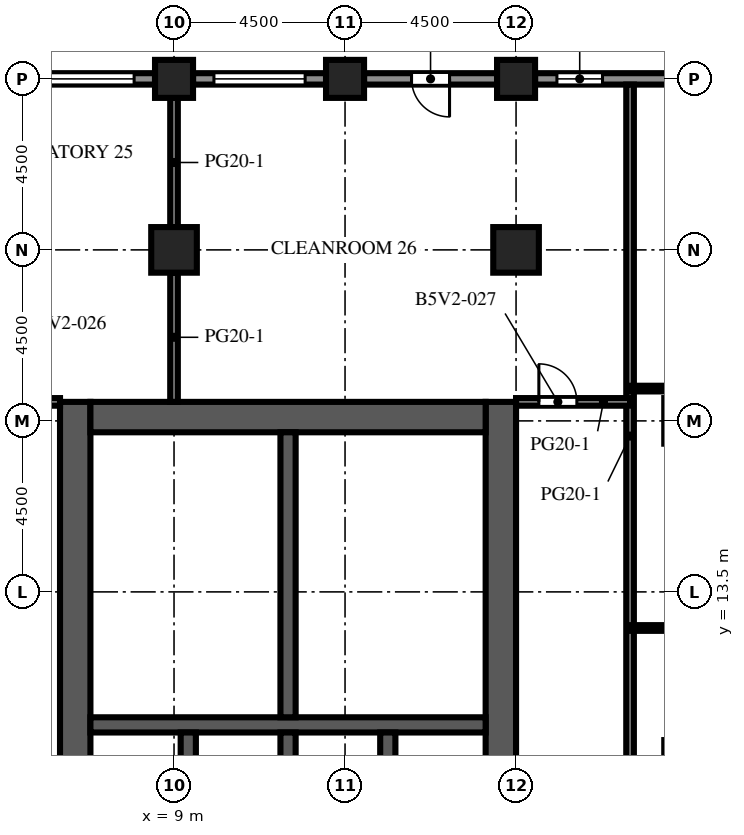
"""IFC4 building model, lengths in metres.
Left out: names, types, materials, properties, quantities, classifications, styles, units other than length and angle.
Written with IfcOpenShell. Run it as: python <this file> out.ifc"""

import sys

from ifc_helpers import new_model, si_unit, direction, frame, frame_2d, origin, origin_2d, place, context, subcontext, project, spatial, rectangle, extrude, element, fill, save


model = new_model("IFC4")
c1 = context("Model", 3, precision=1e-05, world=origin(), true_north=direction((0.0, 1.0)))
c2 = subcontext(c1, "Body", "Model", "MODEL_VIEW")
j1 = project(units=[si_unit("LENGTHUNIT", "METRE"), si_unit("PLANEANGLEUNIT", "RADIAN")], contexts=[c1])
p1 = place(None, origin())
s1 = spatial("IfcSite", under=j1, at=p1, CompositionType="ELEMENT")
p2 = place(p1, origin())
s2 = spatial("IfcBuilding", under=s1, at=p2, CompositionType="ELEMENT")
p3 = place(p2, frame((0.0, 0.0, 177.3)))
s3 = spatial("IfcBuildingStorey", under=s2, at=p3, CompositionType="ELEMENT", Elevation=177.3)
for number, where, z_axis, x_axis in (
    (1, (9.0, 27.0, 0.0), (0.0, 0.0, 1.0), (1.0, 0.0, 0.0)),
    (2, (13.5, 27.0, 0.0), (0.0, 0.0, 1.0), (1.0, 0.0, 0.0)),
    (3, (18.0, 27.0, 0.0), (0.0, 0.0, 1.0), (1.0, 0.0, 0.0)),
):
    element("IfcColumn", number, at=place(p3, frame(where, z_axis=z_axis, x_axis=x_axis)), inside=s3, PredefinedType="COLUMN", context=c2, shape_type="SweptSolid", body=[
        extrude(rectangle(XDim=1.0, YDim=1.0, at=origin_2d()), origin(), (0.0, 0.0, 1.0), 4.1),
    ])
for number, where, z_axis, x_axis in (
    (4, (9.0, 22.5, 0.0), (0.0, 0.0, 1.0), (1.0, 0.0, 0.0)),
    (5, (18.0, 22.5, 0.0), (0.0, 0.0, 1.0), (1.0, 0.0, 0.0)),
):
    element("IfcColumn", number, at=place(p3, frame(where, z_axis=z_axis, x_axis=x_axis)), inside=s3, PredefinedType="COLUMN", context=c2, shape_type="SweptSolid", body=[
        extrude(rectangle(XDim=1.2, YDim=1.2, at=origin_2d()), origin(), (0.0, 0.0, 1.0), 4.1),
    ])
p4 = place(p3, frame((6.4, -9.0, 0.0), z_axis=(0.0, 0.0, 1.0), x_axis=(0.0, 1.0, 0.0)))
e6 = element("IfcWall", 6, at=p4, inside=s3, PredefinedType="SHEAR", context=c2, shape_type="SweptSolid", body=[
    extrude(rectangle(XDim=27.5, YDim=0.8, at=frame_2d((13.75, 0.0))), origin(), (0.0, 0.0, 1.0), 4.1),
])
p5 = place(p4, frame((12.55, 0.0, 0.0)))
e7 = element("IfcOpeningElement", 7, at=p5, cuts=e6, PredefinedType="OPENING", context=c2, shape_type="SweptSolid", body=[
    extrude(rectangle(XDim=2.4, YDim=2.4, at=frame_2d((1.2, 1.2))), frame((0.0, 0.41, 0.0), z_axis=(0.0, -1.0, 0.0), x_axis=(1.0, 0.0, 0.0)), (0.0, 0.0, 1.0), 0.82),
])
p6 = place(p4, frame((3.85, 0.0, 0.0)))
e8 = element("IfcOpeningElement", 8, at=p6, cuts=e6, PredefinedType="OPENING", context=c2, shape_type="SweptSolid", body=[
    extrude(rectangle(XDim=0.95, YDim=2.1, at=frame_2d((0.475, 1.05))), frame((0.0, 0.41, 0.0), z_axis=(0.0, -1.0, 0.0), x_axis=(1.0, 0.0, 0.0)), (0.0, 0.0, 1.0), 0.82),
])
p7 = place(p4, frame((23.475, 0.0, 0.0)))
e9 = element("IfcOpeningElement", 9, at=p7, cuts=e6, PredefinedType="OPENING", context=c2, shape_type="SweptSolid", body=[
    extrude(rectangle(XDim=1.2, YDim=2.1, at=frame_2d((0.6, 1.05))), frame((0.0, 0.41, 0.0), z_axis=(0.0, -1.0, 0.0), x_axis=(1.0, 0.0, 0.0)), (0.0, 0.0, 1.0), 0.82),
])
p8 = place(p3, frame((17.6, -9.0, 0.0), z_axis=(0.0, 0.0, 1.0), x_axis=(0.0, 1.0, 0.0)))
e10 = element("IfcWall", 10, at=p8, inside=s3, PredefinedType="SHEAR", context=c2, shape_type="SweptSolid", body=[
    extrude(rectangle(XDim=27.5, YDim=0.8, at=frame_2d((13.75, 0.0))), origin(), (0.0, 0.0, 1.0), 4.1),
])
p9 = place(p8, frame((12.55, 0.0, 0.0)))
e11 = element("IfcOpeningElement", 11, at=p9, cuts=e10, PredefinedType="OPENING", context=c2, shape_type="SweptSolid", body=[
    extrude(rectangle(XDim=2.4, YDim=2.4, at=frame_2d((1.2, 1.2))), frame((0.0, 0.41, 0.0), z_axis=(0.0, -1.0, 0.0), x_axis=(1.0, 0.0, 0.0)), (0.0, 0.0, 1.0), 0.82),
])
p10 = place(p8, frame((6.825, 0.0, 0.0)))
e12 = element("IfcOpeningElement", 12, at=p10, cuts=e10, PredefinedType="OPENING", context=c2, shape_type="SweptSolid", body=[
    extrude(rectangle(XDim=1.2, YDim=2.1, at=frame_2d((0.6, 1.05))), frame((0.0, 0.41, 0.0), z_axis=(0.0, -1.0, 0.0), x_axis=(1.0, 0.0, 0.0)), (0.0, 0.0, 1.0), 0.82),
])
p11 = place(p8, frame((19.475, 0.0, 0.0)))
e13 = element("IfcOpeningElement", 13, at=p11, cuts=e10, PredefinedType="OPENING", context=c2, shape_type="SweptSolid", body=[
    extrude(rectangle(XDim=1.2, YDim=2.1, at=frame_2d((0.6, 1.05))), frame((0.0, 0.41, 0.0), z_axis=(0.0, -1.0, 0.0), x_axis=(1.0, 0.0, 0.0)), (0.0, 0.0, 1.0), 0.82),
])
p12 = place(p3, frame((6.8, 18.1, 0.0), z_axis=(0.0, 0.0, 1.0), x_axis=(1.0, 0.0, 0.0)))
e14 = element("IfcWall", 14, at=p12, inside=s3, PredefinedType="SHEAR", context=c2, shape_type="SweptSolid", body=[
    extrude(rectangle(XDim=10.4, YDim=0.8, at=frame_2d((5.2, 0.0))), origin(), (0.0, 0.0, 1.0), 4.1),
])
p13 = place(p3, frame((6.8, 10.0, 0.0), z_axis=(0.0, 0.0, 1.0), x_axis=(1.0, 0.0, 0.0)))
e15 = element("IfcWall", 15, at=p13, inside=s3, PredefinedType="SHEAR", context=c2, shape_type="SweptSolid", body=[
    extrude(rectangle(XDim=10.4, YDim=0.4, at=frame_2d((5.2, 0.0))), origin(), (0.0, 0.0, 1.0), 4.1),
])
for number, where, z_axis, x_axis in (
    (16, (9.375, 6.9, 0.0), (0.0, 0.0, 1.0), (0.0, 1.0, 0.0)),
    (17, (12.0, 6.9, 0.0), (0.0, 0.0, 1.0), (0.0, 1.0, 0.0)),
    (18, (14.625, 6.9, 0.0), (0.0, 0.0, 1.0), (0.0, 1.0, 0.0)),
):
    element("IfcWall", number, at=place(p3, frame(where, z_axis=z_axis, x_axis=x_axis)), inside=s3, PredefinedType="SHEAR", context=c2, shape_type="SweptSolid", body=[
        extrude(rectangle(XDim=2.9, YDim=0.4, at=frame_2d((1.45, 0.0))), origin(), (0.0, 0.0, 1.0), 4.1),
    ])
p14 = place(p3, frame((12.0, 10.2, 0.0), z_axis=(0.0, 0.0, 1.0), x_axis=(0.0, 1.0, 0.0)))
e19 = element("IfcWall", 19, at=p14, inside=s3, PredefinedType="SHEAR", context=c2, shape_type="SweptSolid", body=[
    extrude(rectangle(XDim=7.5, YDim=0.4, at=frame_2d((3.75, 0.0))), origin(), (0.0, 0.0, 1.0), 4.1),
])
p15 = place(p3, frame((18.5, 27.0, 0.0), z_axis=(0.0, 0.0, 1.0), x_axis=(1.0, 0.0, 0.0)))
e20 = element("IfcWall", 20, at=p15, inside=s3, PredefinedType="SOLIDWALL", context=c2, shape_type="SweptSolid", body=[
    extrude(rectangle(XDim=3.5, YDim=0.3, at=frame_2d((1.75, 0.0))), origin(), (0.0, 0.0, 1.0), 2.85),
])
p16 = place(p15, frame((0.575, 0.0, 0.8)))
e21 = element("IfcOpeningElement", 21, at=p16, cuts=e20, PredefinedType="OPENING", context=c2, shape_type="SweptSolid", body=[
    extrude(rectangle(XDim=1.2, YDim=1.7, at=frame_2d((0.6, 0.85))), frame((0.0, 0.16, 0.0), z_axis=(0.0, -1.0, 0.0), x_axis=(1.0, 0.0, 0.0)), (0.0, 0.0, 1.0), 0.32),
])
p17 = place(p3, frame((14.0, 27.0, 0.0), z_axis=(0.0, 0.0, 1.0), x_axis=(1.0, 0.0, 0.0)))
e22 = element("IfcWall", 22, at=p17, inside=s3, PredefinedType="SOLIDWALL", context=c2, shape_type="SweptSolid", body=[
    extrude(rectangle(XDim=3.5, YDim=0.3, at=frame_2d((1.75, 0.0))), origin(), (0.0, 0.0, 1.0), 2.85),
])
p18 = place(p17, frame((1.25, 0.0, 0.0)))
e23 = element("IfcOpeningElement", 23, at=p18, cuts=e22, PredefinedType="OPENING", context=c2, shape_type="SweptSolid", body=[
    extrude(rectangle(XDim=1.0, YDim=2.2, at=frame_2d((0.5, 1.1))), frame((0.0, 0.16, 0.0), z_axis=(0.0, -1.0, 0.0), x_axis=(1.0, 0.0, 0.0)), (0.0, 0.0, 1.0), 0.32),
])
p19 = place(p3, frame((9.5, 27.0, 0.0), z_axis=(0.0, 0.0, 1.0), x_axis=(1.0, 0.0, 0.0)))
e24 = element("IfcWall", 24, at=p19, inside=s3, PredefinedType="SOLIDWALL", context=c2, shape_type="SweptSolid", body=[
    extrude(rectangle(XDim=3.5, YDim=0.3, at=frame_2d((1.75, 0.0))), origin(), (0.0, 0.0, 1.0), 2.85),
])
p20 = place(p19, frame((0.55, 0.0, 0.8)))
e25 = element("IfcOpeningElement", 25, at=p20, cuts=e24, PredefinedType="OPENING", context=c2, shape_type="SweptSolid", body=[
    extrude(rectangle(XDim=2.4, YDim=1.7, at=frame_2d((1.2, 0.85))), frame((0.0, 0.16, 0.0), z_axis=(0.0, -1.0, 0.0), x_axis=(1.0, 0.0, 0.0)), (0.0, 0.0, 1.0), 0.32),
])
p21 = place(p3, frame((5.0, 27.0, 0.0), z_axis=(0.0, 0.0, 1.0), x_axis=(1.0, 0.0, 0.0)))
e26 = element("IfcWall", 26, at=p21, inside=s3, PredefinedType="SOLIDWALL", context=c2, shape_type="SweptSolid", body=[
    extrude(rectangle(XDim=3.5, YDim=0.3, at=frame_2d((1.75, 0.0))), origin(), (0.0, 0.0, 1.0), 2.85),
])
p22 = place(p21, frame((0.55, 0.0, 0.8)))
e27 = element("IfcOpeningElement", 27, at=p22, cuts=e26, PredefinedType="OPENING", context=c2, shape_type="SweptSolid", body=[
    extrude(rectangle(XDim=2.4, YDim=1.7, at=frame_2d((1.2, 0.85))), frame((0.0, 0.16, 0.0), z_axis=(0.0, -1.0, 0.0), x_axis=(1.0, 0.0, 0.0)), (0.0, 0.0, 1.0), 0.32),
])
p23 = place(p3, frame((6.8, 12.45, 0.0), z_axis=(0.0, 0.0, 1.0), x_axis=(1.0, 0.0, 0.0)))
e28 = element("IfcWall", 28, at=p23, inside=s3, PredefinedType="PARTITIONING", context=c2, shape_type="SweptSolid", body=[
    extrude(rectangle(XDim=1.3, YDim=0.1, at=frame_2d((0.65, 0.0))), origin(), (0.0, 0.0, 1.0), 3.65),
])
p24 = place(p23, frame((0.2, 0.0, 0.0)))
e29 = element("IfcOpeningElement", 29, at=p24, cuts=e28, PredefinedType="OPENING", context=c2, shape_type="SweptSolid", body=[
    extrude(rectangle(XDim=0.9, YDim=2.1, at=frame_2d((0.45, 1.05))), frame((0.0, 0.06, 0.0), z_axis=(0.0, -1.0, 0.0), x_axis=(1.0, 0.0, 0.0)), (0.0, 0.0, 1.0), 0.12),
])
p25 = place(p3, frame((8.1, 12.45, 0.0), z_axis=(0.0, 0.0, 1.0), x_axis=(1.0, 0.0, 0.0)))
e30 = element("IfcWall", 30, at=p25, inside=s3, PredefinedType="PARTITIONING", context=c2, shape_type="SweptSolid", body=[
    extrude(rectangle(XDim=3.7, YDim=0.1, at=frame_2d((1.85, 0.0))), origin(), (0.0, 0.0, 1.0), 3.65),
])
p26 = place(p3, frame((8.1, 12.45, 0.0), z_axis=(0.0, 0.0, 1.0), x_axis=(0.0, 1.0, 0.0)))
e31 = element("IfcWall", 31, at=p26, inside=s3, PredefinedType="PARTITIONING", context=c2, shape_type="SweptSolid", body=[
    extrude(rectangle(XDim=2.625, YDim=0.1, at=frame_2d((1.312, 0.0))), origin(), (0.0, 0.0, 1.0), 3.65),
])
p27 = place(p26, frame((0.812, 0.0, 0.0)))
e32 = element("IfcOpeningElement", 32, at=p27, cuts=e31, PredefinedType="OPENING", context=c2, shape_type="SweptSolid", body=[
    extrude(rectangle(XDim=1.0, YDim=2.1, at=frame_2d((0.5, 1.05))), frame((0.0, 0.06, 0.0), z_axis=(0.0, -1.0, 0.0), x_axis=(1.0, 0.0, 0.0)), (0.0, 0.0, 1.0), 0.12),
])
p28 = place(p3, frame((8.1, 15.075, 0.0), z_axis=(0.0, 0.0, 1.0), x_axis=(0.0, 1.0, 0.0)))
e33 = element("IfcWall", 33, at=p28, inside=s3, PredefinedType="PARTITIONING", context=c2, shape_type="SweptSolid", body=[
    extrude(rectangle(XDim=2.625, YDim=0.1, at=frame_2d((1.312, 0.0))), origin(), (0.0, 0.0, 1.0), 3.65),
])
p29 = place(p28, frame((0.812, 0.0, 0.0)))
e34 = element("IfcOpeningElement", 34, at=p29, cuts=e33, PredefinedType="OPENING", context=c2, shape_type="SweptSolid", body=[
    extrude(rectangle(XDim=1.0, YDim=2.1, at=frame_2d((0.5, 1.05))), frame((0.0, 0.06, 0.0), z_axis=(0.0, -1.0, 0.0), x_axis=(1.0, 0.0, 0.0)), (0.0, 0.0, 1.0), 0.12),
])
p30 = place(p3, frame((8.1, 15.075, 0.0), z_axis=(0.0, 0.0, 1.0), x_axis=(1.0, 0.0, 0.0)))
e35 = element("IfcWall", 35, at=p30, inside=s3, PredefinedType="PARTITIONING", context=c2, shape_type="SweptSolid", body=[
    extrude(rectangle(XDim=3.7, YDim=0.1, at=frame_2d((1.85, 0.0))), origin(), (0.0, 0.0, 1.0), 3.65),
])
for number, where, z_axis, x_axis in (
    (36, (9.0, 18.5, 0.0), (0.0, 0.0, 1.0), (0.0, 1.0, 0.0)),
    (37, (9.0, 23.1, 0.0), (0.0, 0.0, 1.0), (0.0, 1.0, 0.0)),
):
    element("IfcWall", number, at=place(p3, frame(where, z_axis=z_axis, x_axis=x_axis)), inside=s3, PredefinedType="PARTITIONING", context=c2, shape_type="SweptSolid", body=[
        extrude(rectangle(XDim=3.4, YDim=0.2, at=frame_2d((1.7, 0.0))), origin(), (0.0, 0.0, 1.0), 3.65),
    ])
p31 = place(p3, frame((21.0, 26.85, 0.0), z_axis=(0.0, 0.0, 1.0), x_axis=(0.0, -1.0, 0.0)))
e38 = element("IfcWall", 38, at=p31, inside=s3, PredefinedType="PARTITIONING", context=c2, shape_type="SweptSolid", body=[
    extrude(rectangle(XDim=20.6, YDim=0.2, at=frame_2d((10.3, 0.0))), origin(), (0.0, 0.0, 1.0), 3.65),
])
p32 = place(p31, frame((18.5, 0.0, 0.0)))
e39 = element("IfcOpeningElement", 39, at=p32, cuts=e38, PredefinedType="OPENING", context=c2, shape_type="SweptSolid", body=[
    extrude(rectangle(XDim=1.0, YDim=2.1, at=frame_2d((0.5, 1.05))), frame((0.0, 0.11, 0.0), z_axis=(0.0, -1.0, 0.0), x_axis=(1.0, 0.0, 0.0)), (0.0, 0.0, 1.0), 0.22),
])
p33 = place(p3, frame((21.0, 12.55, 0.0), z_axis=(0.0, 0.0, 1.0), x_axis=(1.0, 0.0, 0.0)))
e40 = element("IfcWall", 40, at=p33, inside=s3, PredefinedType="PARTITIONING", context=c2, shape_type="SweptSolid", body=[
    extrude(rectangle(XDim=5.85, YDim=0.15, at=frame_2d((2.925, 0.0))), origin(), (0.0, 0.0, 1.0), 3.65),
])
p34 = place(p33, frame((3.1, 0.0, 0.0)))
e41 = element("IfcOpeningElement", 41, at=p34, cuts=e40, PredefinedType="OPENING", context=c2, shape_type="SweptSolid", body=[
    extrude(rectangle(XDim=1.0, YDim=2.1, at=frame_2d((0.5, 1.05))), frame((0.0, 0.085, 0.0), z_axis=(0.0, -1.0, 0.0), x_axis=(1.0, 0.0, 0.0)), (0.0, 0.0, 1.0), 0.17),
])
p35 = place(p3, frame((1.5, 18.5, 0.0), z_axis=(0.0, 0.0, 1.0), x_axis=(1.0, 0.0, 0.0)))
e42 = element("IfcWall", 42, at=p35, inside=s3, PredefinedType="PARTITIONING", context=c2, shape_type="SweptSolid", body=[
    extrude(rectangle(XDim=4.5, YDim=0.2, at=frame_2d((2.25, 0.0))), origin(), (0.0, 0.0, 1.0), 3.65),
])
p36 = place(p35, frame((2.1, 0.0, 0.0)))
e43 = element("IfcOpeningElement", 43, at=p36, cuts=e42, PredefinedType="OPENING", context=c2, shape_type="SweptSolid", body=[
    extrude(rectangle(XDim=1.0, YDim=2.1, at=frame_2d((0.5, 1.05))), frame((0.0, 0.11, 0.0), z_axis=(0.0, -1.0, 0.0), x_axis=(1.0, 0.0, 0.0)), (0.0, 0.0, 1.0), 0.22),
])
p37 = place(p3, frame((18.0, 18.5, 0.0), z_axis=(0.0, 0.0, 1.0), x_axis=(1.0, 0.0, 0.0)))
e44 = element("IfcWall", 44, at=p37, inside=s3, PredefinedType="PARTITIONING", context=c2, shape_type="SweptSolid", body=[
    extrude(rectangle(XDim=3.0, YDim=0.2, at=frame_2d((1.5, 0.0))), origin(), (0.0, 0.0, 1.0), 3.65),
])
p38 = place(p37, frame((0.6, 0.0, 0.0)))
e45 = element("IfcOpeningElement", 45, at=p38, cuts=e44, PredefinedType="OPENING", context=c2, shape_type="SweptSolid", body=[
    extrude(rectangle(XDim=1.0, YDim=2.1, at=frame_2d((0.5, 1.05))), frame((0.0, 0.11, 0.0), z_axis=(0.0, -1.0, 0.0), x_axis=(1.0, 0.0, 0.0)), (0.0, 0.0, 1.0), 0.22),
])
p39 = place(p3, frame((21.0, 18.85, 0.0), z_axis=(0.0, 0.0, 1.0), x_axis=(1.0, 0.0, 0.0)))
e46 = element("IfcWall", 46, at=p39, inside=s3, PredefinedType="PARTITIONING", context=c2, shape_type="SweptSolid", body=[
    extrude(rectangle(XDim=5.85, YDim=0.15, at=frame_2d((2.925, 0.0))), origin(), (0.0, 0.0, 1.0), 3.65),
])
p40 = place(p39, frame((2.6, 0.0, 0.0)))
e47 = element("IfcOpeningElement", 47, at=p40, cuts=e46, PredefinedType="OPENING", context=c2, shape_type="SweptSolid", body=[
    extrude(rectangle(XDim=1.0, YDim=2.1, at=frame_2d((0.5, 1.05))), frame((0.0, 0.085, 0.0), z_axis=(0.0, -1.0, 0.0), x_axis=(1.0, 0.0, 0.0)), (0.0, 0.0, 1.0), 0.17),
])
p41 = place(p16, origin())
e48 = element("IfcWindow", 48, at=p41, inside=s3, PartitioningType="SINGLE_PANEL", PredefinedType="WINDOW", context=c2, shape_type="SweptSolid", body=[
    extrude(rectangle(XDim=1.2, YDim=1.7, at=frame_2d((0.6, 0.85))), frame((0.0, 0.03, 0.0), z_axis=(0.0, -1.0, 0.0), x_axis=(1.0, 0.0, 0.0)), (0.0, 0.0, 1.0), 0.06),
])
fill(e21, e48)
p42 = place(p18, origin())
e49 = element("IfcDoor", 49, at=p42, inside=s3, OperationType="SINGLE_SWING_RIGHT", PredefinedType="DOOR", context=c2, shape_type="SweptSolid", body=[
    extrude(rectangle(XDim=1.0, YDim=2.2, at=frame_2d((0.5, 1.1))), frame((0.0, 0.025, 0.0), z_axis=(0.0, -1.0, 0.0), x_axis=(1.0, 0.0, 0.0)), (0.0, 0.0, 1.0), 0.05),
])
fill(e23, e49)
p43 = place(p20, origin())
e50 = element("IfcWindow", 50, at=p43, inside=s3, PartitioningType="SINGLE_PANEL", PredefinedType="WINDOW", context=c2, shape_type="SweptSolid", body=[
    extrude(rectangle(XDim=2.4, YDim=1.7, at=frame_2d((1.2, 0.85))), frame((0.0, 0.03, 0.0), z_axis=(0.0, -1.0, 0.0), x_axis=(1.0, 0.0, 0.0)), (0.0, 0.0, 1.0), 0.06),
])
fill(e25, e50)
p44 = place(p22, origin())
e51 = element("IfcWindow", 51, at=p44, inside=s3, PartitioningType="SINGLE_PANEL", PredefinedType="WINDOW", context=c2, shape_type="SweptSolid", body=[
    extrude(rectangle(XDim=2.4, YDim=1.7, at=frame_2d((1.2, 0.85))), frame((0.0, 0.03, 0.0), z_axis=(0.0, -1.0, 0.0), x_axis=(1.0, 0.0, 0.0)), (0.0, 0.0, 1.0), 0.06),
])
fill(e27, e51)
p45 = place(p11, frame((1.2, 0.0, 0.0), z_axis=(0.0, 0.0, 1.0), x_axis=(-1.0, 0.0, 0.0)))
e52 = element("IfcDoor", 52, at=p45, inside=s3, OperationType="SINGLE_SWING_LEFT", PredefinedType="DOOR", context=c2, shape_type="SweptSolid", body=[
    extrude(rectangle(XDim=1.2, YDim=2.1, at=frame_2d((0.6, 1.05))), frame((0.0, 0.025, 0.0), z_axis=(0.0, -1.0, 0.0), x_axis=(1.0, 0.0, 0.0)), (0.0, 0.0, 1.0), 0.05),
])
fill(e13, e52)
p46 = place(p24, origin())
e53 = element("IfcDoor", 53, at=p46, inside=s3, OperationType="SINGLE_SWING_RIGHT", PredefinedType="DOOR", context=c2, shape_type="SweptSolid", body=[
    extrude(rectangle(XDim=0.9, YDim=2.1, at=frame_2d((0.45, 1.05))), frame((0.0, 0.025, 0.0), z_axis=(0.0, -1.0, 0.0), x_axis=(1.0, 0.0, 0.0)), (0.0, 0.0, 1.0), 0.05),
])
fill(e29, e53)
p47 = place(p7, origin())
e54 = element("IfcDoor", 54, at=p47, inside=s3, OperationType="SINGLE_SWING_LEFT", PredefinedType="DOOR", context=c2, shape_type="SweptSolid", body=[
    extrude(rectangle(XDim=1.2, YDim=2.1, at=frame_2d((0.6, 1.05))), frame((0.0, -0.325, 0.0), z_axis=(0.0, -1.0, 0.0), x_axis=(1.0, 0.0, 0.0)), (0.0, 0.0, 1.0), 0.05),
])
fill(e9, e54)
p48 = place(p27, origin())
e55 = element("IfcDoor", 55, at=p48, inside=s3, OperationType="SINGLE_SWING_RIGHT", PredefinedType="DOOR", context=c2, shape_type="SweptSolid", body=[
    extrude(rectangle(XDim=1.0, YDim=2.1, at=frame_2d((0.5, 1.05))), frame((0.0, 0.025, 0.0), z_axis=(0.0, -1.0, 0.0), x_axis=(1.0, 0.0, 0.0)), (0.0, 0.0, 1.0), 0.05),
])
fill(e32, e55)
p49 = place(p29, origin())
e56 = element("IfcDoor", 56, at=p49, inside=s3, OperationType="SINGLE_SWING_LEFT", PredefinedType="DOOR", context=c2, shape_type="SweptSolid", body=[
    extrude(rectangle(XDim=1.0, YDim=2.1, at=frame_2d((0.5, 1.05))), frame((0.0, 0.025, 0.0), z_axis=(0.0, -1.0, 0.0), x_axis=(1.0, 0.0, 0.0)), (0.0, 0.0, 1.0), 0.05),
])
fill(e34, e56)
p50 = place(p38, origin())
e57 = element("IfcDoor", 57, at=p50, inside=s3, OperationType="SINGLE_SWING_LEFT", PredefinedType="DOOR", context=c2, shape_type="SweptSolid", body=[
    extrude(rectangle(XDim=1.0, YDim=2.1, at=frame_2d((0.5, 1.05))), frame((0.0, 0.025, 0.0), z_axis=(0.0, -1.0, 0.0), x_axis=(1.0, 0.0, 0.0)), (0.0, 0.0, 1.0), 0.05),
])
fill(e45, e57)
save(model, sys.argv[1])
